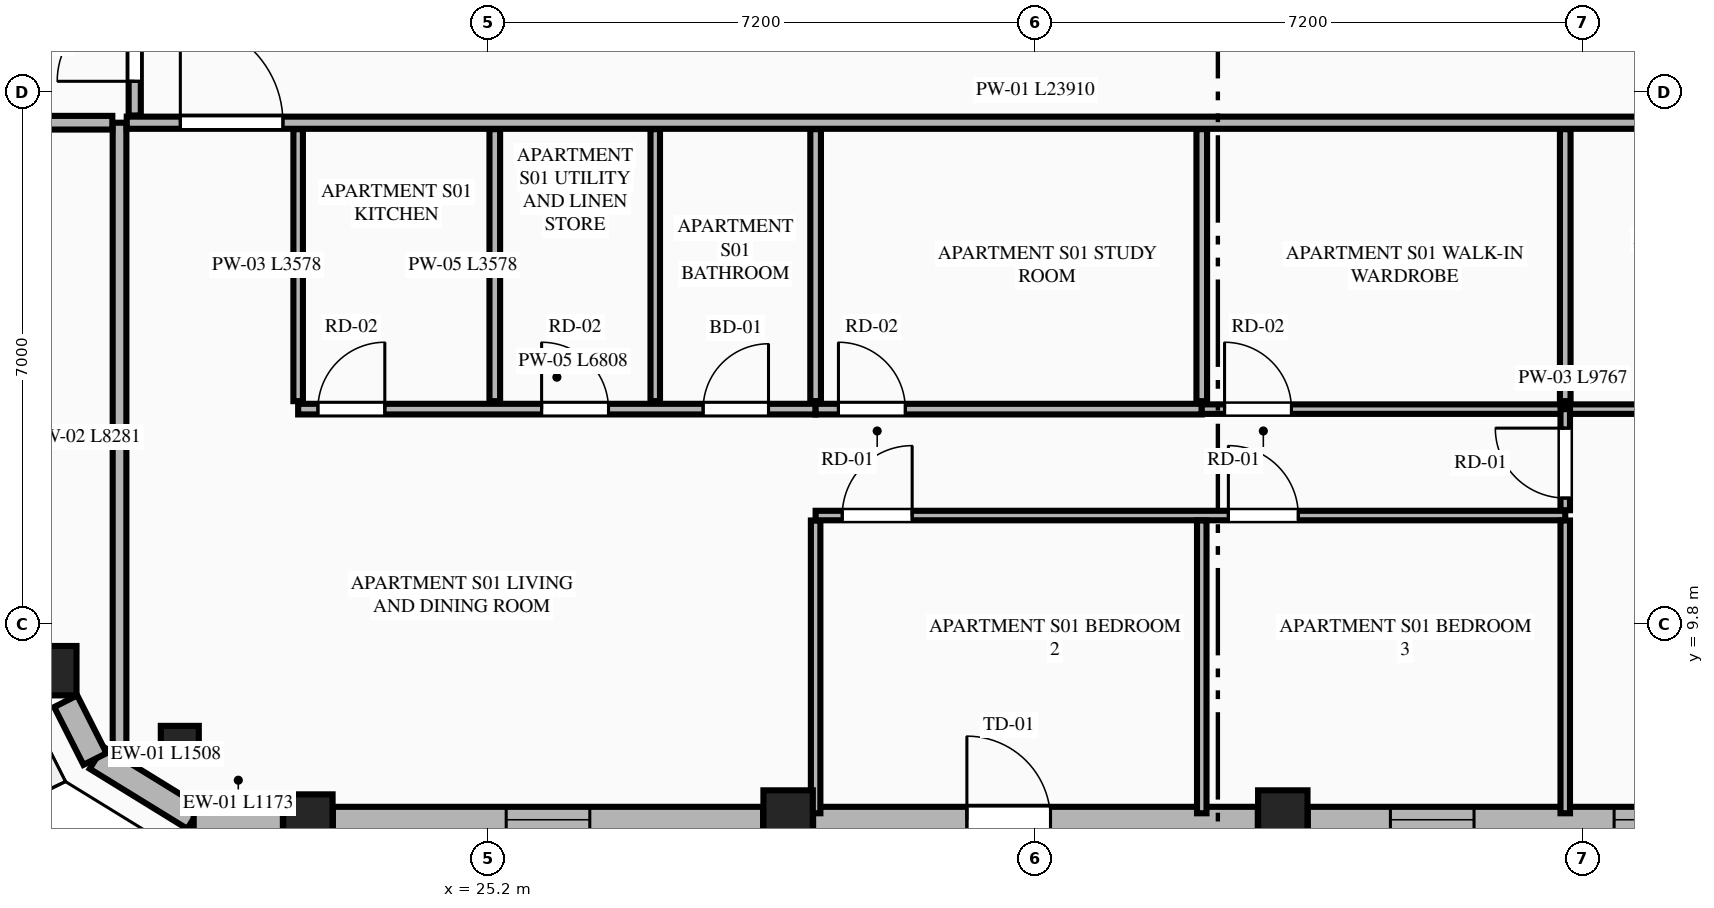
"""IFC4 building model, lengths in metres.
Left out: names, types, materials, properties, quantities, classifications, styles, units other than length and angle.
Written with IfcOpenShell. Run it as: python <this file> out.ifc"""

import sys

from ifc_helpers import new_model, si_unit, direction, frame, frame_2d, origin, origin_2d, place, context, subcontext, project, spatial, rectangle, extrude, element, fill, save


model = new_model("IFC4")
c1 = context("Model", 3, precision=1e-05, world=origin(), true_north=direction((0.0, 1.0)))
c2 = subcontext(c1, "Body", "Model", "MODEL_VIEW")
j1 = project(units=[si_unit("LENGTHUNIT", "METRE"), si_unit("PLANEANGLEUNIT", "RADIAN")], contexts=[c1])
p1 = place(None, origin())
s1 = spatial("IfcSite", under=j1, at=p1, CompositionType="ELEMENT")
p2 = place(p1, origin())
s2 = spatial("IfcBuilding", under=s1, at=p2, CompositionType="ELEMENT")
p3 = place(p2, frame((0.0, 0.0, 291.5)))
s3 = spatial("IfcBuildingStorey", under=s2, at=p3, CompositionType="ELEMENT", Elevation=291.5)
for number, where, z_axis, x_axis in (
    (1, (22.828, 7.239, 0.0), (0.0, 0.0, 1.0), (1.0, 0.0, 0.0)),
    (2, (29.146, 7.292, 0.0), (0.0, 0.0, 1.0), (1.0, 0.0, 0.0)),
    (3, (35.654, 7.292, 0.0), (0.0, 0.0, 1.0), (1.0, 0.0, 0.0)),
    (4, (19.459, 9.191, 0.0), (0.0, 0.0, 1.0), (1.0, 0.0, 0.0)),
):
    element("IfcColumn", number, at=place(p3, frame(where, z_axis=z_axis, x_axis=x_axis)), inside=s3, PredefinedType="COLUMN", context=c2, shape_type="SweptSolid", body=[
        extrude(rectangle(XDim=0.65, YDim=0.65, at=origin_2d()), origin(), (0.0, 0.0, 1.0), 4.0),
    ])
p4 = place(p3, frame((21.143, 8.215, 0.0), z_axis=(0.0, 0.0, 1.0), x_axis=(0.865256437757, -0.501329529272, 0.0)))
e5 = element("IfcColumn", 5, at=p4, inside=s3, PredefinedType="PILASTER", context=c2, shape_type="SweptSolid", body=[
    extrude(rectangle(XDim=0.5, YDim=0.35, at=origin_2d()), origin(), (0.0, 0.0, 1.0), 4.0),
])
p5 = place(p3, frame((20.047, 8.045, 0.0), z_axis=(0.0, 0.0, 1.0), x_axis=(0.851680557619, -0.52406128246, 0.0)))
e6 = element("IfcWall", 6, at=p5, inside=s3, PredefinedType="STANDARD", context=c2, shape_type="SweptSolid", body=[
    extrude(rectangle(XDim=1.508, YDim=0.34, at=frame_2d((0.754, 0.0))), origin(), (0.0, 0.0, 1.0), 3.8),
])
p6 = place(p3, frame((21.326, 7.23, 0.0), z_axis=(0.0, 0.0, 1.0), x_axis=(1.0, 0.0, 0.0)))
e7 = element("IfcWall", 7, at=p6, inside=s3, PredefinedType="STANDARD", context=c2, shape_type="SweptSolid", body=[
    extrude(rectangle(XDim=1.173, YDim=0.34, at=frame_2d((0.586, 0.0))), origin(), (0.0, 0.0, 1.0), 3.8),
])
p7 = place(p3, frame((23.157, 7.23, 0.0), z_axis=(0.0, 0.0, 1.0), x_axis=(1.0, 0.0, 0.0)))
e8 = element("IfcWall", 8, at=p7, inside=s3, PredefinedType="STANDARD", context=c2, shape_type="SweptSolid", body=[
    extrude(rectangle(XDim=5.66, YDim=0.34, at=frame_2d((2.83, 0.0))), origin(), (0.0, 0.0, 1.0), 2.99),
])
p8 = place(p7, frame((2.28, 0.0, 0.75)))
e9 = element("IfcOpeningElement", 9, at=p8, cuts=e8, PredefinedType="OPENING", context=c2, shape_type="SweptSolid", body=[
    extrude(rectangle(XDim=1.1, YDim=2.0, at=frame_2d((0.55, 1.0))), frame((0.0, 0.18, 0.0), z_axis=(0.0, -1.0, 0.0), x_axis=(1.0, 0.0, 0.0)), (0.0, 0.0, 1.0), 0.36),
])
p9 = place(p3, frame((29.475, 7.23, 0.0), z_axis=(0.0, 0.0, 1.0), x_axis=(1.0, 0.0, 0.0)))
e10 = element("IfcWall", 10, at=p9, inside=s3, PredefinedType="STANDARD", context=c2, shape_type="SweptSolid", body=[
    extrude(rectangle(XDim=5.85, YDim=0.34, at=frame_2d((2.925, 0.0))), origin(), (0.0, 0.0, 1.0), 2.99),
])
p10 = place(p9, frame((2.023, 0.0, 0.0)))
e11 = element("IfcOpeningElement", 11, at=p10, cuts=e10, PredefinedType="OPENING", context=c2, shape_type="SweptSolid", body=[
    extrude(rectangle(XDim=1.1, YDim=2.25, at=frame_2d((0.55, 1.125))), frame((0.0, 0.18, 0.0), z_axis=(0.0, -1.0, 0.0), x_axis=(1.0, 0.0, 0.0)), (0.0, 0.0, 1.0), 0.36),
])
p11 = place(p3, frame((35.983, 7.23, 0.0), z_axis=(0.0, 0.0, 1.0), x_axis=(1.0, 0.0, 0.0)))
e12 = element("IfcWall", 12, at=p11, inside=s3, PredefinedType="STANDARD", context=c2, shape_type="SweptSolid", body=[
    extrude(rectangle(XDim=5.66, YDim=0.34, at=frame_2d((2.83, 0.0))), origin(), (0.0, 0.0, 1.0), 2.99),
])
p12 = place(p11, frame((1.087, 0.0, 0.75)))
e13 = element("IfcOpeningElement", 13, at=p12, cuts=e12, PredefinedType="OPENING", context=c2, shape_type="SweptSolid", body=[
    extrude(rectangle(XDim=1.1, YDim=2.0, at=frame_2d((0.55, 1.0))), frame((0.0, 0.18, 0.0), z_axis=(0.0, -1.0, 0.0), x_axis=(1.0, 0.0, 0.0)), (0.0, 0.0, 1.0), 0.36),
])
p13 = place(p11, frame((4.03, 0.0, 0.75)))
e14 = element("IfcOpeningElement", 14, at=p13, cuts=e12, PredefinedType="OPENING", context=c2, shape_type="SweptSolid", body=[
    extrude(rectangle(XDim=1.1, YDim=2.0, at=frame_2d((0.55, 1.0))), frame((0.0, 0.18, 0.0), z_axis=(0.0, -1.0, 0.0), x_axis=(1.0, 0.0, 0.0)), (0.0, 0.0, 1.0), 0.36),
])
p14 = place(p3, frame((19.642, 8.789, 0.0), z_axis=(0.0, 0.0, 1.0), x_axis=(0.451907025977, -0.8920650424, 0.0)))
e15 = element("IfcWall", 15, at=p14, inside=s3, PredefinedType="STANDARD", context=c2, shape_type="SweptSolid", body=[
    extrude(rectangle(XDim=0.852, YDim=0.34, at=frame_2d((0.426, 0.0))), origin(), (0.0, 0.0, 1.0), 3.8),
])
p15 = place(p3, frame((20.35, 8.119, 0.0), z_axis=(0.0, 0.0, 1.0), x_axis=(0.0, 1.0, 0.0)))
e16 = element("IfcWall", 16, at=p15, inside=s3, PredefinedType="PARTITIONING", context=c2, shape_type="SweptSolid", body=[
    extrude(rectangle(XDim=8.281, YDim=0.18, at=frame_2d((4.141, 0.0))), origin(), (0.0, 0.0, 1.0), 3.8),
])
p16 = place(p3, frame((20.445, 16.4, 0.0), z_axis=(0.0, 0.0, 1.0), x_axis=(1.0, 0.0, 0.0)))
e17 = element("IfcWall", 17, at=p16, inside=s3, PredefinedType="PARTITIONING", context=c2, shape_type="SweptSolid", body=[
    extrude(rectangle(XDim=23.91, YDim=0.16, at=frame_2d((11.955, 0.0))), origin(), (0.0, 0.0, 1.0), 3.8),
])
p17 = place(p16, frame((0.705, 0.0, 0.0)))
e18 = element("IfcOpeningElement", 18, at=p17, cuts=e17, PredefinedType="OPENING", context=c2, shape_type="SweptSolid", body=[
    extrude(rectangle(XDim=1.35, YDim=2.35, at=frame_2d((0.675, 1.175))), frame((0.0, 0.09, 0.0), z_axis=(0.0, -1.0, 0.0), x_axis=(1.0, 0.0, 0.0)), (0.0, 0.0, 1.0), 0.18),
])
p18 = place(p3, frame((22.7, 12.737, 0.0), z_axis=(0.0, 0.0, 1.0), x_axis=(0.0, 1.0, 0.0)))
e19 = element("IfcWall", 19, at=p18, inside=s3, PredefinedType="PARTITIONING", context=c2, shape_type="SweptSolid", body=[
    extrude(rectangle(XDim=3.578, YDim=0.125, at=frame_2d((1.789, 0.0))), origin(), (0.0, 0.0, 1.0), 3.257),
])
p19 = place(p3, frame((22.7, 12.632, 0.0), z_axis=(0.0, 0.0, 1.0), x_axis=(1.0, 0.0, 0.0)))
e20 = element("IfcWall", 20, at=p19, inside=s3, PredefinedType="PLUMBINGWALL", context=c2, shape_type="SweptSolid", body=[
    extrude(rectangle(XDim=6.808, YDim=0.14, at=frame_2d((3.404, 0.0))), origin(), (0.0, 0.0, 1.0), 3.8),
])
p20 = place(p19, frame((5.328, 0.0, 0.0)))
e21 = element("IfcOpeningElement", 21, at=p20, cuts=e20, PredefinedType="OPENING", context=c2, shape_type="SweptSolid", body=[
    extrude(rectangle(XDim=0.86, YDim=2.1, at=frame_2d((0.43, 1.05))), frame((0.0, 0.08, 0.0), z_axis=(0.0, -1.0, 0.0), x_axis=(1.0, 0.0, 0.0)), (0.0, 0.0, 1.0), 0.16),
])
p21 = place(p19, frame((0.26, 0.0, 0.0)))
e22 = element("IfcOpeningElement", 22, at=p21, cuts=e20, PredefinedType="OPENING", context=c2, shape_type="SweptSolid", body=[
    extrude(rectangle(XDim=0.88, YDim=2.15, at=frame_2d((0.44, 1.075))), frame((0.0, 0.08, 0.0), z_axis=(0.0, -1.0, 0.0), x_axis=(1.0, 0.0, 0.0)), (0.0, 0.0, 1.0), 0.16),
])
p22 = place(p19, frame((3.203, 0.0, 0.0)))
e23 = element("IfcOpeningElement", 23, at=p22, cuts=e20, PredefinedType="OPENING", context=c2, shape_type="SweptSolid", body=[
    extrude(rectangle(XDim=0.88, YDim=2.15, at=frame_2d((0.44, 1.075))), frame((0.0, 0.08, 0.0), z_axis=(0.0, -1.0, 0.0), x_axis=(1.0, 0.0, 0.0)), (0.0, 0.0, 1.0), 0.16),
])
p23 = place(p3, frame((29.508, 12.632, 0.0), z_axis=(0.0, 0.0, 1.0), x_axis=(1.0, 0.0, 0.0)))
e24 = element("IfcWall", 24, at=p23, inside=s3, PredefinedType="PLUMBINGWALL", context=c2, shape_type="SweptSolid", body=[
    extrude(rectangle(XDim=5.08, YDim=0.14, at=frame_2d((2.54, 0.0))), origin(), (0.0, 0.0, 1.0), 3.8),
])
p24 = place(p23, frame((0.3, 0.0, 0.0)))
e25 = element("IfcOpeningElement", 25, at=p24, cuts=e24, PredefinedType="OPENING", context=c2, shape_type="SweptSolid", body=[
    extrude(rectangle(XDim=0.88, YDim=2.15, at=frame_2d((0.44, 1.075))), frame((0.0, 0.08, 0.0), z_axis=(0.0, -1.0, 0.0), x_axis=(1.0, 0.0, 0.0)), (0.0, 0.0, 1.0), 0.16),
])
p25 = place(p3, frame((34.588, 12.632, 0.0), z_axis=(0.0, 0.0, 1.0), x_axis=(1.0, 0.0, 0.0)))
e26 = element("IfcWall", 26, at=p25, inside=s3, PredefinedType="PARTITIONING", context=c2, shape_type="SweptSolid", body=[
    extrude(rectangle(XDim=9.767, YDim=0.125, at=frame_2d((4.884, 0.0))), origin(), (0.0, 0.0, 1.0), 3.8),
])
p26 = place(p25, frame((6.849, 0.0, 0.0)))
e27 = element("IfcOpeningElement", 27, at=p26, cuts=e26, PredefinedType="OPENING", context=c2, shape_type="SweptSolid", body=[
    extrude(rectangle(XDim=0.86, YDim=2.1, at=frame_2d((0.43, 1.05))), frame((0.0, 0.073, 0.0), z_axis=(0.0, -1.0, 0.0), x_axis=(1.0, 0.0, 0.0)), (0.0, 0.0, 1.0), 0.145),
])
p27 = place(p25, frame((0.3, 0.0, 0.0)))
e28 = element("IfcOpeningElement", 28, at=p27, cuts=e26, PredefinedType="OPENING", context=c2, shape_type="SweptSolid", body=[
    extrude(rectangle(XDim=0.88, YDim=2.15, at=frame_2d((0.44, 1.075))), frame((0.0, 0.073, 0.0), z_axis=(0.0, -1.0, 0.0), x_axis=(1.0, 0.0, 0.0)), (0.0, 0.0, 1.0), 0.145),
])
p28 = place(p3, frame((25.287, 12.737, 0.0), z_axis=(0.0, 0.0, 1.0), x_axis=(0.0, 1.0, 0.0)))
e29 = element("IfcWall", 29, at=p28, inside=s3, PredefinedType="PLUMBINGWALL", context=c2, shape_type="SweptSolid", body=[
    extrude(rectangle(XDim=3.578, YDim=0.14, at=frame_2d((1.789, 0.0))), origin(), (0.0, 0.0, 1.0), 3.8),
])
p29 = place(p3, frame((27.398, 12.737, 0.0), z_axis=(0.0, 0.0, 1.0), x_axis=(0.0, 1.0, 0.0)))
e30 = element("IfcWall", 30, at=p29, inside=s3, PredefinedType="PARTITIONING", context=c2, shape_type="SweptSolid", body=[
    extrude(rectangle(XDim=3.578, YDim=0.125, at=frame_2d((1.789, 0.0))), origin(), (0.0, 0.0, 1.0), 3.8),
])
p30 = place(p3, frame((29.508, 7.315, 0.0), z_axis=(0.0, 0.0, 1.0), x_axis=(0.0, 1.0, 0.0)))
e31 = element("IfcWall", 31, at=p30, inside=s3, PredefinedType="PARTITIONING", context=c2, shape_type="SweptSolid", body=[
    extrude(rectangle(XDim=3.852, YDim=0.125, at=frame_2d((1.926, 0.0))), origin(), (0.0, 0.0, 1.0), 3.8),
])
p31 = place(p3, frame((29.508, 11.232, 0.0), z_axis=(0.0, 0.0, 1.0), x_axis=(1.0, 0.0, 0.0)))
e32 = element("IfcWall", 32, at=p31, inside=s3, PredefinedType="PARTITIONING", context=c2, shape_type="SweptSolid", body=[
    extrude(rectangle(XDim=9.862, YDim=0.125, at=frame_2d((4.931, 0.0))), origin(), (0.0, 0.0, 1.0), 3.8),
])
p32 = place(p31, frame((0.35, 0.0, 0.0)))
e33 = element("IfcOpeningElement", 33, at=p32, cuts=e32, PredefinedType="OPENING", context=c2, shape_type="SweptSolid", body=[
    extrude(rectangle(XDim=0.92, YDim=2.15, at=frame_2d((0.46, 1.075))), frame((0.0, 0.073, 0.0), z_axis=(0.0, -1.0, 0.0), x_axis=(1.0, 0.0, 0.0)), (0.0, 0.0, 1.0), 0.145),
])
p33 = place(p31, frame((5.43, 0.0, 0.0)))
e34 = element("IfcOpeningElement", 34, at=p33, cuts=e32, PredefinedType="OPENING", context=c2, shape_type="SweptSolid", body=[
    extrude(rectangle(XDim=0.92, YDim=2.15, at=frame_2d((0.46, 1.075))), frame((0.0, 0.073, 0.0), z_axis=(0.0, -1.0, 0.0), x_axis=(1.0, 0.0, 0.0)), (0.0, 0.0, 1.0), 0.145),
])
p34 = place(p3, frame((39.37, 11.302, 0.0), z_axis=(0.0, 0.0, 1.0), x_axis=(0.0, 1.0, 0.0)))
e35 = element("IfcWall", 35, at=p34, inside=s3, PredefinedType="PARTITIONING", context=c2, shape_type="SweptSolid", body=[
    extrude(rectangle(XDim=1.33, YDim=0.125, at=frame_2d((0.665, 0.0))), origin(), (0.0, 0.0, 1.0), 3.8),
])
p35 = place(p34, frame((0.16, 0.0, 0.0)))
e36 = element("IfcOpeningElement", 36, at=p35, cuts=e35, PredefinedType="OPENING", context=c2, shape_type="SweptSolid", body=[
    extrude(rectangle(XDim=0.92, YDim=2.15, at=frame_2d((0.46, 1.075))), frame((0.0, 0.073, 0.0), z_axis=(0.0, -1.0, 0.0), x_axis=(1.0, 0.0, 0.0)), (0.0, 0.0, 1.0), 0.145),
])
for number, where, z_axis, x_axis in (
    (37, (29.508, 12.737, 0.0), (0.0, 0.0, 1.0), (0.0, 1.0, 0.0)),
    (38, (34.588, 12.737, 0.0), (0.0, 0.0, 1.0), (0.0, 1.0, 0.0)),
):
    element("IfcWall", number, at=place(p3, frame(where, z_axis=z_axis, x_axis=x_axis)), inside=s3, PredefinedType="PLUMBINGWALL", context=c2, shape_type="SweptSolid", body=[
        extrude(rectangle(XDim=3.578, YDim=0.14, at=frame_2d((1.789, 0.0))), origin(), (0.0, 0.0, 1.0), 3.8),
    ])
for number, where, z_axis, x_axis in (
    (39, (34.588, 7.315, 0.0), (0.0, 0.0, 1.0), (0.0, 1.0, 0.0)),
    (40, (39.37, 7.315, 0.0), (0.0, 0.0, 1.0), (0.0, 1.0, 0.0)),
):
    element("IfcWall", number, at=place(p3, frame(where, z_axis=z_axis, x_axis=x_axis)), inside=s3, PredefinedType="PARTITIONING", context=c2, shape_type="SweptSolid", body=[
        extrude(rectangle(XDim=3.852, YDim=0.125, at=frame_2d((1.926, 0.0))), origin(), (0.0, 0.0, 1.0), 3.8),
    ])
p36 = place(p3, frame((39.37, 12.737, 0.0), z_axis=(0.0, 0.0, 1.0), x_axis=(0.0, 1.0, 0.0)))
e41 = element("IfcWall", 41, at=p36, inside=s3, PredefinedType="PLUMBINGWALL", context=c2, shape_type="SweptSolid", body=[
    extrude(rectangle(XDim=3.578, YDim=0.14, at=frame_2d((1.789, 0.0))), origin(), (0.0, 0.0, 1.0), 3.8),
])
p37 = place(p3, frame((16.034, 16.4, 0.0), z_axis=(0.0, 0.0, 1.0), x_axis=(1.0, 0.0, 0.0)))
e42 = element("IfcWall", 42, at=p37, inside=s3, PredefinedType="PARTITIONING", context=c2, shape_type="SweptSolid", body=[
    extrude(rectangle(XDim=4.221, YDim=0.18, at=frame_2d((2.11, 0.0))), origin(), (0.0, 0.0, 1.0), 3.8),
])
p38 = place(p3, frame((20.55, 16.495, 0.0), z_axis=(0.0, 0.0, 1.0), x_axis=(0.0, 1.0, 0.0)))
e43 = element("IfcWall", 43, at=p38, inside=s3, PredefinedType="PARTITIONING", context=c2, shape_type="SweptSolid", body=[
    extrude(rectangle(XDim=18.41, YDim=0.16, at=frame_2d((9.205, 0.0))), origin(), (0.0, 0.0, 1.0), 3.487),
])
p39 = place(p38, frame((0.45, 0.0, 0.0)))
e44 = element("IfcOpeningElement", 44, at=p39, cuts=e43, PredefinedType="OPENING", context=c2, shape_type="SweptSolid", body=[
    extrude(rectangle(XDim=1.02, YDim=2.25, at=frame_2d((0.51, 1.125))), frame((0.0, 0.09, 0.0), z_axis=(0.0, -1.0, 0.0), x_axis=(1.0, 0.0, 0.0)), (0.0, 0.0, 1.0), 0.18),
])
p40 = place(p8, origin())
e45 = element("IfcWindow", 45, at=p40, inside=s3, PartitioningType="SINGLE_PANEL", PredefinedType="WINDOW", context=c2, shape_type="SweptSolid", body=[
    extrude(rectangle(XDim=1.1, YDim=2.0, at=frame_2d((0.55, 1.0))), frame((0.0, 0.03, 0.0), z_axis=(0.0, -1.0, 0.0), x_axis=(1.0, 0.0, 0.0)), (0.0, 0.0, 1.0), 0.06),
])
fill(e9, e45)
p41 = place(p10, origin())
e46 = element("IfcDoor", 46, at=p41, inside=s3, OperationType="SINGLE_SWING_LEFT", PredefinedType="DOOR", context=c2, shape_type="SweptSolid", body=[
    extrude(rectangle(XDim=1.1, YDim=2.25, at=frame_2d((0.55, 1.125))), frame((0.0, 0.025, 0.0), z_axis=(0.0, -1.0, 0.0), x_axis=(1.0, 0.0, 0.0)), (0.0, 0.0, 1.0), 0.05),
])
fill(e11, e46)
p42 = place(p12, origin())
e47 = element("IfcWindow", 47, at=p42, inside=s3, PartitioningType="SINGLE_PANEL", PredefinedType="WINDOW", context=c2, shape_type="SweptSolid", body=[
    extrude(rectangle(XDim=1.1, YDim=2.0, at=frame_2d((0.55, 1.0))), frame((0.0, 0.03, 0.0), z_axis=(0.0, -1.0, 0.0), x_axis=(1.0, 0.0, 0.0)), (0.0, 0.0, 1.0), 0.06),
])
fill(e13, e47)
p43 = place(p20, origin())
e48 = element("IfcDoor", 48, at=p43, inside=s3, OperationType="SINGLE_SWING_RIGHT", PredefinedType="DOOR", context=c2, shape_type="SweptSolid", body=[
    extrude(rectangle(XDim=0.86, YDim=2.1, at=frame_2d((0.43, 1.05))), frame((0.0, 0.025, 0.0), z_axis=(0.0, -1.0, 0.0), x_axis=(1.0, 0.0, 0.0)), (0.0, 0.0, 1.0), 0.05),
])
fill(e21, e48)
p44 = place(p17, origin())
e49 = element("IfcDoor", 49, at=p44, inside=s3, OperationType="SINGLE_SWING_LEFT", PredefinedType="DOOR", context=c2, shape_type="SweptSolid", body=[
    extrude(rectangle(XDim=1.35, YDim=2.35, at=frame_2d((0.675, 1.175))), frame((0.0, 0.025, 0.0), z_axis=(0.0, -1.0, 0.0), x_axis=(1.0, 0.0, 0.0)), (0.0, 0.0, 1.0), 0.05),
])
fill(e18, e49)
p45 = place(p21, origin())
e50 = element("IfcDoor", 50, at=p45, inside=s3, OperationType="SINGLE_SWING_RIGHT", PredefinedType="DOOR", context=c2, shape_type="SweptSolid", body=[
    extrude(rectangle(XDim=0.88, YDim=2.15, at=frame_2d((0.44, 1.075))), frame((0.0, 0.025, 0.0), z_axis=(0.0, -1.0, 0.0), x_axis=(1.0, 0.0, 0.0)), (0.0, 0.0, 1.0), 0.05),
])
fill(e22, e50)
p46 = place(p22, origin())
e51 = element("IfcDoor", 51, at=p46, inside=s3, OperationType="SINGLE_SWING_LEFT", PredefinedType="DOOR", context=c2, shape_type="SweptSolid", body=[
    extrude(rectangle(XDim=0.88, YDim=2.15, at=frame_2d((0.44, 1.075))), frame((0.0, 0.025, 0.0), z_axis=(0.0, -1.0, 0.0), x_axis=(1.0, 0.0, 0.0)), (0.0, 0.0, 1.0), 0.05),
])
fill(e23, e51)
p47 = place(p24, origin())
e52 = element("IfcDoor", 52, at=p47, inside=s3, OperationType="SINGLE_SWING_LEFT", PredefinedType="DOOR", context=c2, shape_type="SweptSolid", body=[
    extrude(rectangle(XDim=0.88, YDim=2.15, at=frame_2d((0.44, 1.075))), frame((0.0, 0.025, 0.0), z_axis=(0.0, -1.0, 0.0), x_axis=(1.0, 0.0, 0.0)), (0.0, 0.0, 1.0), 0.05),
])
fill(e25, e52)
p48 = place(p32, origin())
e53 = element("IfcDoor", 53, at=p48, inside=s3, OperationType="SINGLE_SWING_RIGHT", PredefinedType="DOOR", context=c2, shape_type="SweptSolid", body=[
    extrude(rectangle(XDim=0.92, YDim=2.15, at=frame_2d((0.46, 1.075))), frame((0.0, 0.025, 0.0), z_axis=(0.0, -1.0, 0.0), x_axis=(1.0, 0.0, 0.0)), (0.0, 0.0, 1.0), 0.05),
])
fill(e33, e53)
p49 = place(p33, origin())
e54 = element("IfcDoor", 54, at=p49, inside=s3, OperationType="SINGLE_SWING_LEFT", PredefinedType="DOOR", context=c2, shape_type="SweptSolid", body=[
    extrude(rectangle(XDim=0.92, YDim=2.15, at=frame_2d((0.46, 1.075))), frame((0.0, 0.025, 0.0), z_axis=(0.0, -1.0, 0.0), x_axis=(1.0, 0.0, 0.0)), (0.0, 0.0, 1.0), 0.05),
])
fill(e34, e54)
p50 = place(p35, origin())
e55 = element("IfcDoor", 55, at=p50, inside=s3, OperationType="SINGLE_SWING_RIGHT", PredefinedType="DOOR", context=c2, shape_type="SweptSolid", body=[
    extrude(rectangle(XDim=0.92, YDim=2.15, at=frame_2d((0.46, 1.075))), frame((0.0, 0.025, 0.0), z_axis=(0.0, -1.0, 0.0), x_axis=(1.0, 0.0, 0.0)), (0.0, 0.0, 1.0), 0.05),
])
fill(e36, e55)
p51 = place(p27, origin())
e56 = element("IfcDoor", 56, at=p51, inside=s3, OperationType="SINGLE_SWING_LEFT", PredefinedType="DOOR", context=c2, shape_type="SweptSolid", body=[
    extrude(rectangle(XDim=0.88, YDim=2.15, at=frame_2d((0.44, 1.075))), frame((0.0, 0.025, 0.0), z_axis=(0.0, -1.0, 0.0), x_axis=(1.0, 0.0, 0.0)), (0.0, 0.0, 1.0), 0.05),
])
fill(e28, e56)
p52 = place(p39, origin())
e57 = element("IfcDoor", 57, at=p52, inside=s3, OperationType="SINGLE_SWING_LEFT", PredefinedType="DOOR", context=c2, shape_type="SweptSolid", body=[
    extrude(rectangle(XDim=1.02, YDim=2.25, at=frame_2d((0.51, 1.125))), frame((0.0, 0.025, 0.0), z_axis=(0.0, -1.0, 0.0), x_axis=(1.0, 0.0, 0.0)), (0.0, 0.0, 1.0), 0.05),
])
fill(e44, e57)
p53 = place(p13, origin())
e58 = element("IfcWindow", 58, at=p53, inside=s3, PartitioningType="SINGLE_PANEL", PredefinedType="WINDOW", context=c2, shape_type="SweptSolid", body=[
    extrude(rectangle(XDim=1.1, YDim=2.0, at=frame_2d((0.55, 1.0))), frame((0.0, 0.03, 0.0), z_axis=(0.0, -1.0, 0.0), x_axis=(1.0, 0.0, 0.0)), (0.0, 0.0, 1.0), 0.06),
])
fill(e14, e58)
save(model, sys.argv[1])
